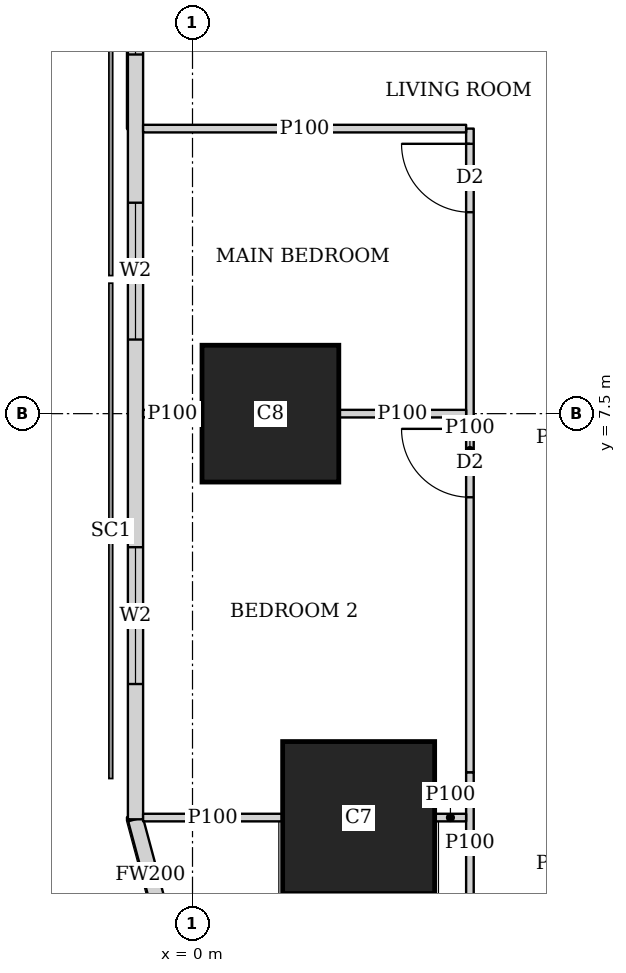
"""IFC4 building model, lengths in metres.
Left out: names, types, materials, properties, quantities, classifications, styles, units other than length and angle.
Written with IfcOpenShell. Run it as: python <this file> out.ifc"""

import sys

from ifc_helpers import new_model, si_unit, direction, frame, frame_2d, origin, origin_2d, place, context, subcontext, project, spatial, rectangle, extrude, element, fill, save


model = new_model("IFC4")
c1 = context("Model", 3, precision=1e-05, world=origin(), true_north=direction((0.0, 1.0)))
c2 = subcontext(c1, "Body", "Model", "MODEL_VIEW")
j1 = project(units=[si_unit("LENGTHUNIT", "METRE"), si_unit("PLANEANGLEUNIT", "RADIAN")], contexts=[c1])
p1 = place(None, origin())
s1 = spatial("IfcSite", under=j1, at=p1, CompositionType="ELEMENT")
p2 = place(p1, origin())
s2 = spatial("IfcBuilding", under=s1, at=p2, CompositionType="ELEMENT")
p3 = place(p2, frame((0.0, 0.0, 184.55)))
s3 = spatial("IfcBuildingStorey", under=s2, at=p3, CompositionType="ELEMENT", Elevation=184.55)
p4 = place(p3, frame((2.186, 2.186, 0.0), z_axis=(0.0, 0.0, 1.0), x_axis=(1.0, 0.0, 0.0)))
e1 = element("IfcColumn", 1, at=p4, inside=s3, PredefinedType="COLUMN", context=c2, shape_type="SweptSolid", body=[
    extrude(rectangle(XDim=2.0, YDim=2.0, at=origin_2d()), origin(), (0.0, 0.0, 1.0), 3.75),
])
p5 = place(p3, frame((1.025, 7.5, 0.0), z_axis=(0.0, 0.0, 1.0), x_axis=(1.0, 0.0, 0.0)))
e2 = element("IfcColumn", 2, at=p5, inside=s3, PredefinedType="COLUMN", context=c2, shape_type="SweptSolid", body=[
    extrude(rectangle(XDim=1.8, YDim=1.8, at=origin_2d()), origin(), (0.0, 0.0, 1.0), 3.75),
])
p6 = place(p3, frame((-0.75, 42.837, 0.0), z_axis=(0.0, 0.0, 1.0), x_axis=(0.0, -1.0, 0.0)))
e3 = element("IfcWall", 3, at=p6, inside=s3, PredefinedType="SOLIDWALL", context=c2, shape_type="SweptSolid", body=[
    extrude(rectangle(XDim=40.674, YDim=0.2, at=frame_2d((20.337, 0.0))), origin(), (0.0, 0.0, 1.0), 3.45),
])
p7 = place(p6, frame((1.78, 0.0, 0.9)))
e4 = element("IfcOpeningElement", 4, at=p7, cuts=e3, PredefinedType="OPENING", context=c2, shape_type="SweptSolid", body=[
    extrude(rectangle(XDim=1.8, YDim=1.5, at=frame_2d((0.9, 0.75))), frame((0.0, 0.11, 0.0), z_axis=(0.0, -1.0, 0.0), x_axis=(1.0, 0.0, 0.0)), (0.0, 0.0, 1.0), 0.22),
])
p8 = place(p6, frame((6.312, 0.0, 0.9)))
e5 = element("IfcOpeningElement", 5, at=p8, cuts=e3, PredefinedType="OPENING", context=c2, shape_type="SweptSolid", body=[
    extrude(rectangle(XDim=1.8, YDim=1.5, at=frame_2d((0.9, 0.75))), frame((0.0, 0.11, 0.0), z_axis=(0.0, -1.0, 0.0), x_axis=(1.0, 0.0, 0.0)), (0.0, 0.0, 1.0), 0.22),
])
p9 = place(p6, frame((10.062, 0.0, 0.9)))
e6 = element("IfcOpeningElement", 6, at=p9, cuts=e3, PredefinedType="OPENING", context=c2, shape_type="SweptSolid", body=[
    extrude(rectangle(XDim=1.8, YDim=1.5, at=frame_2d((0.9, 0.75))), frame((0.0, 0.11, 0.0), z_axis=(0.0, -1.0, 0.0), x_axis=(1.0, 0.0, 0.0)), (0.0, 0.0, 1.0), 0.22),
])
p10 = place(p6, frame((13.812, 0.0, 0.9)))
e7 = element("IfcOpeningElement", 7, at=p10, cuts=e3, PredefinedType="OPENING", context=c2, shape_type="SweptSolid", body=[
    extrude(rectangle(XDim=1.8, YDim=1.5, at=frame_2d((0.9, 0.75))), frame((0.0, 0.11, 0.0), z_axis=(0.0, -1.0, 0.0), x_axis=(1.0, 0.0, 0.0)), (0.0, 0.0, 1.0), 0.22),
])
p11 = place(p6, frame((17.562, 0.0, 0.9)))
e8 = element("IfcOpeningElement", 8, at=p11, cuts=e3, PredefinedType="OPENING", context=c2, shape_type="SweptSolid", body=[
    extrude(rectangle(XDim=1.8, YDim=1.5, at=frame_2d((0.9, 0.75))), frame((0.0, 0.11, 0.0), z_axis=(0.0, -1.0, 0.0), x_axis=(1.0, 0.0, 0.0)), (0.0, 0.0, 1.0), 0.22),
])
p12 = place(p6, frame((21.312, 0.0, 0.9)))
e9 = element("IfcOpeningElement", 9, at=p12, cuts=e3, PredefinedType="OPENING", context=c2, shape_type="SweptSolid", body=[
    extrude(rectangle(XDim=1.8, YDim=1.5, at=frame_2d((0.9, 0.75))), frame((0.0, 0.11, 0.0), z_axis=(0.0, -1.0, 0.0), x_axis=(1.0, 0.0, 0.0)), (0.0, 0.0, 1.0), 0.22),
])
p13 = place(p6, frame((25.062, 0.0, 0.9)))
e10 = element("IfcOpeningElement", 10, at=p13, cuts=e3, PredefinedType="OPENING", context=c2, shape_type="SweptSolid", body=[
    extrude(rectangle(XDim=1.8, YDim=1.5, at=frame_2d((0.9, 0.75))), frame((0.0, 0.11, 0.0), z_axis=(0.0, -1.0, 0.0), x_axis=(1.0, 0.0, 0.0)), (0.0, 0.0, 1.0), 0.22),
])
p14 = place(p6, frame((28.812, 0.0, 0.9)))
e11 = element("IfcOpeningElement", 11, at=p14, cuts=e3, PredefinedType="OPENING", context=c2, shape_type="SweptSolid", body=[
    extrude(rectangle(XDim=1.8, YDim=1.5, at=frame_2d((0.9, 0.75))), frame((0.0, 0.11, 0.0), z_axis=(0.0, -1.0, 0.0), x_axis=(1.0, 0.0, 0.0)), (0.0, 0.0, 1.0), 0.22),
])
p15 = place(p6, frame((32.562, 0.0, 0.9)))
e12 = element("IfcOpeningElement", 12, at=p15, cuts=e3, PredefinedType="OPENING", context=c2, shape_type="SweptSolid", body=[
    extrude(rectangle(XDim=1.8, YDim=1.5, at=frame_2d((0.9, 0.75))), frame((0.0, 0.11, 0.0), z_axis=(0.0, -1.0, 0.0), x_axis=(1.0, 0.0, 0.0)), (0.0, 0.0, 1.0), 0.22),
])
p16 = place(p6, frame((37.094, 0.0, 0.9)))
e13 = element("IfcOpeningElement", 13, at=p16, cuts=e3, PredefinedType="OPENING", context=c2, shape_type="SweptSolid", body=[
    extrude(rectangle(XDim=1.8, YDim=1.5, at=frame_2d((0.9, 0.75))), frame((0.0, 0.11, 0.0), z_axis=(0.0, -1.0, 0.0), x_axis=(1.0, 0.0, 0.0)), (0.0, 0.0, 1.0), 0.22),
])
p17 = place(p3, frame((-0.75, 2.163, 0.0), z_axis=(0.0, 0.0, 1.0), x_axis=(0.259168954497, -0.965832000415, 0.0)))
e14 = element("IfcWall", 14, at=p17, inside=s3, PredefinedType="SOLIDWALL", context=c2, shape_type="SweptSolid", body=[
    extrude(rectangle(XDim=1.513, YDim=0.2, at=frame_2d((0.756, 0.0))), origin(), (0.0, 0.0, 1.0), 3.45),
])
p18 = place(p3, frame((3.65, 0.912, 0.0), z_axis=(0.0, 0.0, 1.0), x_axis=(0.0, 1.0, 0.0)))
e15 = element("IfcWall", 15, at=p18, inside=s3, PredefinedType="PARTITIONING", context=c2, shape_type="SweptSolid", body=[
    extrude(rectangle(XDim=1.87, YDim=0.1, at=frame_2d((0.935, 0.0))), origin(), (0.0, 0.0, 1.0), 2.05),
])
p19 = place(p3, frame((3.65, 2.782, 0.0), z_axis=(0.0, 0.0, 1.0), x_axis=(0.0, 1.0, 0.0)))
e16 = element("IfcWall", 16, at=p19, inside=s3, PredefinedType="PARTITIONING", context=c2, shape_type="SweptSolid", body=[
    extrude(rectangle(XDim=8.468, YDim=0.1, at=frame_2d((4.234, 0.0))), origin(), (0.0, 0.0, 1.0), 3.45),
])
p20 = place(p19, frame((7.368, 0.0, 0.0)))
e17 = element("IfcOpeningElement", 17, at=p20, cuts=e16, PredefinedType="OPENING", context=c2, shape_type="SweptSolid", body=[
    extrude(rectangle(XDim=0.9, YDim=2.1, at=frame_2d((0.45, 1.05))), frame((0.0, 0.06, 0.0), z_axis=(0.0, -1.0, 0.0), x_axis=(1.0, 0.0, 0.0)), (0.0, 0.0, 1.0), 0.12),
])
p21 = place(p19, frame((3.618, 0.0, 0.0)))
e18 = element("IfcOpeningElement", 18, at=p21, cuts=e16, PredefinedType="OPENING", context=c2, shape_type="SweptSolid", body=[
    extrude(rectangle(XDim=0.9, YDim=2.1, at=frame_2d((0.45, 1.05))), frame((0.0, 0.06, 0.0), z_axis=(0.0, -1.0, 0.0), x_axis=(1.0, 0.0, 0.0)), (0.0, 0.0, 1.0), 0.12),
])
p22 = place(p3, frame((-0.65, 2.186, 0.0), z_axis=(0.0, 0.0, 1.0), x_axis=(1.0, 0.0, 0.0)))
e19 = element("IfcWall", 19, at=p22, inside=s3, PredefinedType="PARTITIONING", context=c2, shape_type="SweptSolid", body=[
    extrude(rectangle(XDim=1.835, YDim=0.1, at=frame_2d((0.917, 0.0))), origin(), (0.0, 0.0, 1.0), 3.45),
])
p23 = place(p3, frame((3.187, 2.186, 0.0), z_axis=(0.0, 0.0, 1.0), x_axis=(1.0, 0.0, 0.0)))
e20 = element("IfcWall", 20, at=p23, inside=s3, PredefinedType="PARTITIONING", context=c2, shape_type="SweptSolid", body=[
    extrude(rectangle(XDim=0.413, YDim=0.1, at=frame_2d((0.207, 0.0))), origin(), (0.0, 0.0, 1.0), 2.05),
])
p24 = place(p3, frame((-0.65, 7.5, 0.0), z_axis=(0.0, 0.0, 1.0), x_axis=(1.0, 0.0, 0.0)))
e21 = element("IfcWall", 21, at=p24, inside=s3, PredefinedType="PARTITIONING", context=c2, shape_type="SweptSolid", body=[
    extrude(rectangle(XDim=0.774, YDim=0.1, at=frame_2d((0.387, 0.0))), origin(), (0.0, 0.0, 1.0), 3.45),
])
p25 = place(p3, frame((1.926, 7.5, 0.0), z_axis=(0.0, 0.0, 1.0), x_axis=(1.0, 0.0, 0.0)))
e22 = element("IfcWall", 22, at=p25, inside=s3, PredefinedType="PARTITIONING", context=c2, shape_type="SweptSolid", body=[
    extrude(rectangle(XDim=1.674, YDim=0.1, at=frame_2d((0.837, 0.0))), origin(), (0.0, 0.0, 1.0), 2.05),
])
p26 = place(p3, frame((-0.65, 11.25, 0.0), z_axis=(0.0, 0.0, 1.0), x_axis=(1.0, 0.0, 0.0)))
e23 = element("IfcWall", 23, at=p26, inside=s3, PredefinedType="PARTITIONING", context=c2, shape_type="SweptSolid", body=[
    extrude(rectangle(XDim=4.25, YDim=0.1, at=frame_2d((2.125, 0.0))), origin(), (0.0, 0.0, 1.0), 2.05),
])
p27 = place(p14, origin())
e24 = element("IfcWindow", 24, at=p27, inside=s3, PartitioningType="SINGLE_PANEL", PredefinedType="WINDOW", context=c2, shape_type="SweptSolid", body=[
    extrude(rectangle(XDim=1.8, YDim=1.5, at=frame_2d((0.9, 0.75))), frame((0.0, 0.03, 0.0), z_axis=(0.0, -1.0, 0.0), x_axis=(1.0, 0.0, 0.0)), (0.0, 0.0, 1.0), 0.06),
])
fill(e11, e24)
p28 = place(p15, origin())
e25 = element("IfcWindow", 25, at=p28, inside=s3, PartitioningType="SINGLE_PANEL", PredefinedType="WINDOW", context=c2, shape_type="SweptSolid", body=[
    extrude(rectangle(XDim=1.8, YDim=1.5, at=frame_2d((0.9, 0.75))), frame((0.0, 0.03, 0.0), z_axis=(0.0, -1.0, 0.0), x_axis=(1.0, 0.0, 0.0)), (0.0, 0.0, 1.0), 0.06),
])
fill(e12, e25)
p29 = place(p16, origin())
e26 = element("IfcWindow", 26, at=p29, inside=s3, PartitioningType="SINGLE_PANEL", PredefinedType="WINDOW", context=c2, shape_type="SweptSolid", body=[
    extrude(rectangle(XDim=1.8, YDim=1.5, at=frame_2d((0.9, 0.75))), frame((0.0, 0.03, 0.0), z_axis=(0.0, -1.0, 0.0), x_axis=(1.0, 0.0, 0.0)), (0.0, 0.0, 1.0), 0.06),
])
fill(e13, e26)
p30 = place(p20, origin())
e27 = element("IfcDoor", 27, at=p30, inside=s3, OperationType="SINGLE_SWING_RIGHT", PredefinedType="DOOR", context=c2, shape_type="SweptSolid", body=[
    extrude(rectangle(XDim=0.9, YDim=2.1, at=frame_2d((0.45, 1.05))), frame((0.0, 0.025, 0.0), z_axis=(0.0, -1.0, 0.0), x_axis=(1.0, 0.0, 0.0)), (0.0, 0.0, 1.0), 0.05),
])
fill(e17, e27)
p31 = place(p21, origin())
e28 = element("IfcDoor", 28, at=p31, inside=s3, OperationType="SINGLE_SWING_RIGHT", PredefinedType="DOOR", context=c2, shape_type="SweptSolid", body=[
    extrude(rectangle(XDim=0.9, YDim=2.1, at=frame_2d((0.45, 1.05))), frame((0.0, 0.025, 0.0), z_axis=(0.0, -1.0, 0.0), x_axis=(1.0, 0.0, 0.0)), (0.0, 0.0, 1.0), 0.05),
])
fill(e18, e28)
save(model, sys.argv[1])
